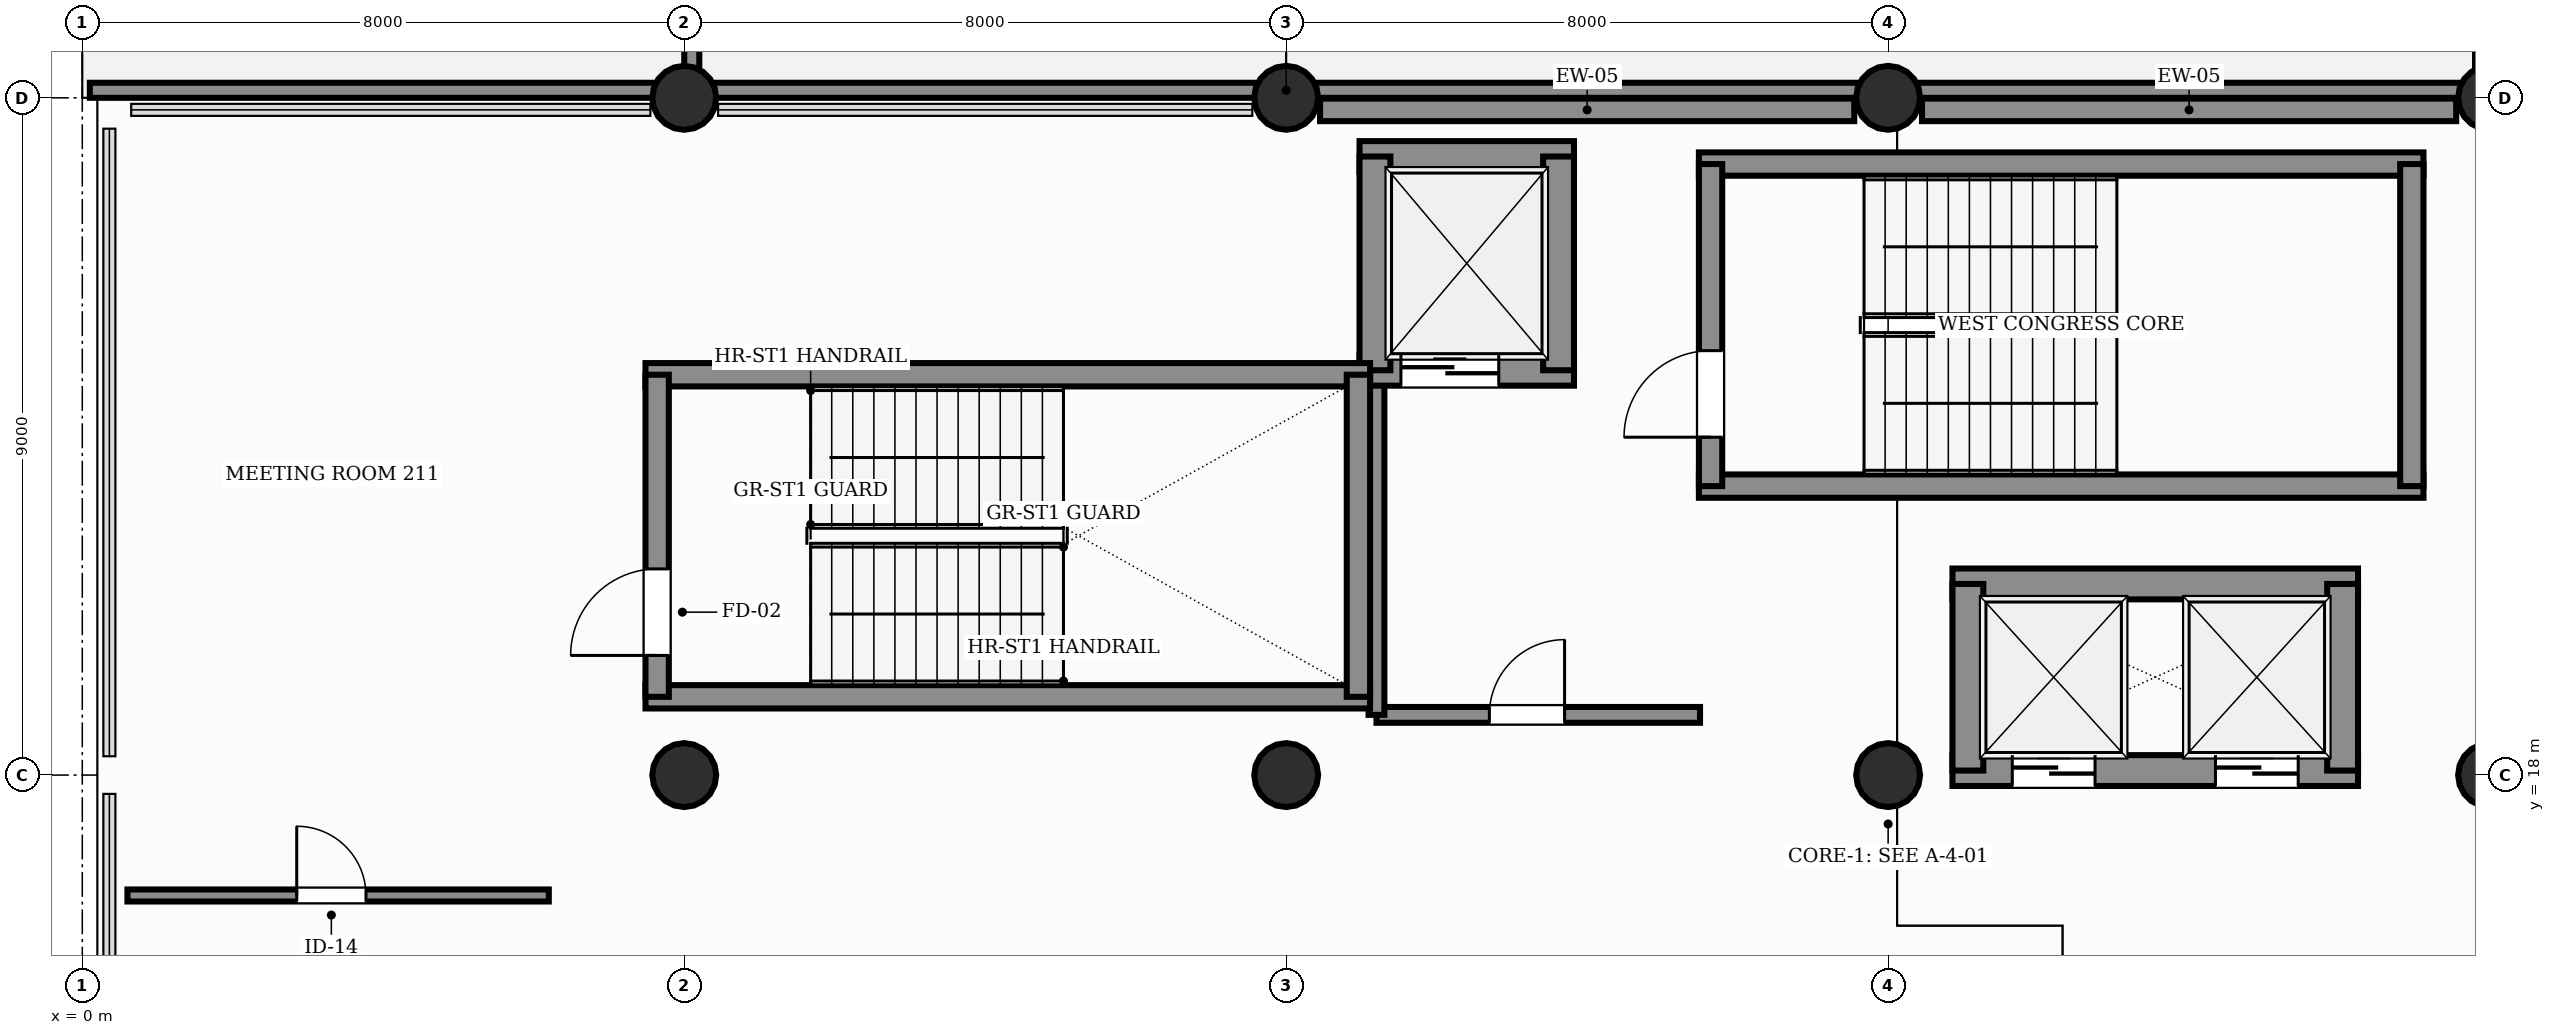
"""IFC4 building model, lengths in metres.
Left out: names, types, materials, properties, quantities, classifications, styles, units other than length and angle.
Written with IfcOpenShell. Run it as: python <this file> out.ifc"""

import sys

from ifc_helpers import new_model, si_unit, direction, frame, frame_2d, origin, origin_2d, place, context, subcontext, project, spatial, rectangle, circle, extrude, element, fill, save


model = new_model("IFC4")
c1 = context("Model", 3, precision=1e-05, world=origin(), true_north=direction((0.0, 1.0)))
c2 = subcontext(c1, "Body", "Model", "MODEL_VIEW")
j1 = project(units=[si_unit("LENGTHUNIT", "METRE"), si_unit("PLANEANGLEUNIT", "RADIAN")], contexts=[c1])
p1 = place(None, origin())
s1 = spatial("IfcSite", under=j1, at=p1, CompositionType="ELEMENT")
p2 = place(p1, origin())
s2 = spatial("IfcBuilding", under=s1, at=p2, CompositionType="ELEMENT")
p3 = place(p2, frame((0.0, 0.0, 11.4)))
s3 = spatial("IfcBuildingStorey", under=s2, at=p3, CompositionType="ELEMENT", Elevation=11.4)
for number, where, z_axis, x_axis in (
    (1, (8.0, 18.0, 0.0), (0.0, 0.0, 1.0), (1.0, 0.0, 0.0)),
    (2, (8.0, 27.0, 0.0), (0.0, 0.0, 1.0), (1.0, 0.0, 0.0)),
    (3, (16.0, 18.0, 0.0), (0.0, 0.0, 1.0), (1.0, 0.0, 0.0)),
    (4, (16.0, 27.0, 0.0), (0.0, 0.0, 1.0), (1.0, 0.0, 0.0)),
    (5, (24.0, 18.0, 0.0), (0.0, 0.0, 1.0), (1.0, 0.0, 0.0)),
    (6, (24.0, 27.0, 0.0), (0.0, 0.0, 1.0), (1.0, 0.0, 0.0)),
    (7, (32.0, 18.0, 0.0), (0.0, 0.0, 1.0), (1.0, 0.0, 0.0)),
    (8, (32.0, 27.0, 0.0), (0.0, 0.0, 1.0), (1.0, 0.0, 0.0)),
):
    element("IfcColumn", number, at=place(p3, frame(where, z_axis=z_axis, x_axis=x_axis)), inside=s3, PredefinedType="COLUMN", context=c2, shape_type="SweptSolid", body=[
        extrude(circle(Radius=0.425, at=origin_2d()), origin(), (0.0, 0.0, 1.0), 4.8),
    ])
for number, where, z_axis, x_axis in (
    (9, (16.45, 26.84, 0.0), (0.0, 0.0, 1.0), (1.0, 0.0, 0.0)),
    (10, (24.45, 26.84, 0.0), (0.0, 0.0, 1.0), (1.0, 0.0, 0.0)),
):
    element("IfcWall", number, at=place(p3, frame(where, z_axis=z_axis, x_axis=x_axis)), inside=s3, PredefinedType="SOLIDWALL", context=c2, shape_type="SweptSolid", body=[
        extrude(rectangle(XDim=7.1, YDim=0.3, at=frame_2d((3.55, 0.0))), origin(), (0.0, 0.0, 1.0), 3.59),
    ])
p4 = place(p3, frame((0.1, 27.1, 0.0), z_axis=(0.0, 0.0, 1.0), x_axis=(1.0, 0.0, 0.0)))
e11 = element("IfcWall", 11, at=p4, inside=s3, PredefinedType="PARAPET", context=c2, shape_type="SweptSolid", body=[
    extrude(rectangle(XDim=31.8, YDim=0.2, at=frame_2d((15.9, 0.0))), origin(), (0.0, 0.0, 1.0), 1.15),
])
p5 = place(p3, frame((31.9, 27.1, 0.0), z_axis=(0.0, 0.0, 1.0), x_axis=(0.0, 1.0, 0.0)))
e12 = element("IfcWall", 12, at=p5, inside=s3, PredefinedType="PARAPET", context=c2, shape_type="SweptSolid", body=[
    extrude(rectangle(XDim=34.65, YDim=0.2, at=frame_2d((17.325, 0.0))), origin(), (0.0, 0.0, 1.0), 1.15),
])
p6 = place(p3, frame((8.1, 36.1, 0.0), z_axis=(0.0, 0.0, 1.0), x_axis=(0.0, -1.0, 0.0)))
e13 = element("IfcWall", 13, at=p6, inside=s3, PredefinedType="PARAPET", context=c2, shape_type="SweptSolid", body=[
    extrude(rectangle(XDim=9.0, YDim=0.2, at=frame_2d((4.5, 0.0))), origin(), (0.0, 0.0, 1.0), 1.15),
])
for number, where, z_axis, x_axis in (
    (14, (21.485, 21.84, 0.0), (0.0, 0.0, 1.0), (1.0, 0.0, 0.0)),
    (15, (21.485, 26.12, 0.0), (0.0, 0.0, 1.0), (1.0, 0.0, 0.0)),
):
    element("IfcWall", number, at=place(p3, frame(where, z_axis=z_axis, x_axis=x_axis)), inside=s3, PredefinedType="SHEAR", context=c2, shape_type="SweptSolid", body=[
        extrude(rectangle(XDim=9.63, YDim=0.31, at=frame_2d((4.815, 0.0))), origin(), (0.0, 0.0, 1.0), 4.8),
    ])
p7 = place(p3, frame((21.64, 21.84, 0.0), z_axis=(0.0, 0.0, 1.0), x_axis=(0.0, 1.0, 0.0)))
e16 = element("IfcWall", 16, at=p7, inside=s3, PredefinedType="SHEAR", context=c2, shape_type="SweptSolid", body=[
    extrude(rectangle(XDim=4.28, YDim=0.31, at=frame_2d((2.14, 0.0))), origin(), (0.0, 0.0, 1.0), 4.8),
])
p8 = place(p7, frame((0.65, 0.0, 0.0)))
e17 = element("IfcOpeningElement", 17, at=p8, cuts=e16, PredefinedType="OPENING", context=c2, shape_type="SweptSolid", body=[
    extrude(rectangle(XDim=1.15, YDim=2.2, at=frame_2d((0.575, 1.1))), frame((0.0, 0.165, 0.0), z_axis=(0.0, -1.0, 0.0), x_axis=(1.0, 0.0, 0.0)), (0.0, 0.0, 1.0), 0.33),
])
p9 = place(p3, frame((30.96, 21.84, 0.0), z_axis=(0.0, 0.0, 1.0), x_axis=(0.0, 1.0, 0.0)))
e18 = element("IfcWall", 18, at=p9, inside=s3, PredefinedType="SHEAR", context=c2, shape_type="SweptSolid", body=[
    extrude(rectangle(XDim=4.28, YDim=0.31, at=frame_2d((2.14, 0.0))), origin(), (0.0, 0.0, 1.0), 4.8),
])
p10 = place(p3, frame((17.2, 18.8, 0.0), z_axis=(0.0, 0.0, 1.0), x_axis=(1.0, 0.0, 0.0)))
e19 = element("IfcWall", 19, at=p10, inside=s3, PredefinedType="PARTITIONING", context=c2, shape_type="SweptSolid", body=[
    extrude(rectangle(XDim=4.3, YDim=0.21, at=frame_2d((2.15, 0.0))), origin(), (0.0, 0.0, 1.0), 3.4),
])
p11 = place(p10, frame((1.5, 0.0, 0.0)))
e20 = element("IfcOpeningElement", 20, at=p11, cuts=e19, PredefinedType="OPENING", context=c2, shape_type="SweptSolid", body=[
    extrude(rectangle(XDim=1.0, YDim=2.15, at=frame_2d((0.5, 1.075))), frame((0.0, 0.115, 0.0), z_axis=(0.0, -1.0, 0.0), x_axis=(1.0, 0.0, 0.0)), (0.0, 0.0, 1.0), 0.23),
])
p12 = place(p3, frame((17.2, 18.8, 0.0), z_axis=(0.0, 0.0, 1.0), x_axis=(0.0, 1.0, 0.0)))
e21 = element("IfcWall", 21, at=p12, inside=s3, PredefinedType="PARTITIONING", context=c2, shape_type="SweptSolid", body=[
    extrude(rectangle(XDim=4.6, YDim=0.21, at=frame_2d((2.3, 0.0))), origin(), (0.0, 0.0, 1.0), 3.4),
])
p13 = place(p3, frame((16.975, 23.38, 0.0), z_axis=(0.0, 0.0, 1.0), x_axis=(1.0, 0.0, 0.0)))
e22 = element("IfcWall", 22, at=p13, inside=s3, PredefinedType="SHEAR", context=c2, shape_type="SweptSolid", body=[
    extrude(rectangle(XDim=2.85, YDim=0.41, at=frame_2d((1.425, 0.0))), origin(), (0.0, 0.0, 1.0), 4.8),
])
p14 = place(p13, frame((0.55, 0.0, 0.0)))
e23 = element("IfcOpeningElement", 23, at=p14, cuts=e22, PredefinedType="OPENING", context=c2, shape_type="SweptSolid", body=[
    extrude(rectangle(XDim=1.3, YDim=2.25, at=frame_2d((0.65, 1.125))), frame((0.0, 0.215, 0.0), z_axis=(0.0, -1.0, 0.0), x_axis=(1.0, 0.0, 0.0)), (0.0, 0.0, 1.0), 0.43),
])
p15 = place(p3, frame((16.975, 26.22, 0.0), z_axis=(0.0, 0.0, 1.0), x_axis=(1.0, 0.0, 0.0)))
e24 = element("IfcWall", 24, at=p15, inside=s3, PredefinedType="SHEAR", context=c2, shape_type="SweptSolid", body=[
    extrude(rectangle(XDim=2.85, YDim=0.41, at=frame_2d((1.425, 0.0))), origin(), (0.0, 0.0, 1.0), 4.8),
])
for number, where, z_axis, x_axis in (
    (25, (17.18, 23.38, 0.0), (0.0, 0.0, 1.0), (0.0, 1.0, 0.0)),
    (26, (19.62, 23.38, 0.0), (0.0, 0.0, 1.0), (0.0, 1.0, 0.0)),
):
    element("IfcWall", number, at=place(p3, frame(where, z_axis=z_axis, x_axis=x_axis)), inside=s3, PredefinedType="SHEAR", context=c2, shape_type="SweptSolid", body=[
        extrude(rectangle(XDim=2.84, YDim=0.41, at=frame_2d((1.42, 0.0))), origin(), (0.0, 0.0, 1.0), 4.8),
    ])
p16 = place(p3, frame((24.855, 18.06, 0.0), z_axis=(0.0, 0.0, 1.0), x_axis=(1.0, 0.0, 0.0)))
e27 = element("IfcWall", 27, at=p16, inside=s3, PredefinedType="SHEAR", context=c2, shape_type="SweptSolid", body=[
    extrude(rectangle(XDim=5.39, YDim=0.41, at=frame_2d((2.695, 0.0))), origin(), (0.0, 0.0, 1.0), 4.8),
])
p17 = place(p16, frame((0.795, 0.0, 0.0)))
e28 = element("IfcOpeningElement", 28, at=p17, cuts=e27, PredefinedType="OPENING", context=c2, shape_type="SweptSolid", body=[
    extrude(rectangle(XDim=1.1, YDim=2.2, at=frame_2d((0.55, 1.1))), frame((0.0, 0.215, 0.0), z_axis=(0.0, -1.0, 0.0), x_axis=(1.0, 0.0, 0.0)), (0.0, 0.0, 1.0), 0.43),
])
p18 = place(p16, frame((3.495, 0.0, 0.0)))
e29 = element("IfcOpeningElement", 29, at=p18, cuts=e27, PredefinedType="OPENING", context=c2, shape_type="SweptSolid", body=[
    extrude(rectangle(XDim=1.1, YDim=2.2, at=frame_2d((0.55, 1.1))), frame((0.0, 0.215, 0.0), z_axis=(0.0, -1.0, 0.0), x_axis=(1.0, 0.0, 0.0)), (0.0, 0.0, 1.0), 0.43),
])
p19 = place(p3, frame((24.855, 20.54, 0.0), z_axis=(0.0, 0.0, 1.0), x_axis=(1.0, 0.0, 0.0)))
e30 = element("IfcWall", 30, at=p19, inside=s3, PredefinedType="SHEAR", context=c2, shape_type="SweptSolid", body=[
    extrude(rectangle(XDim=5.39, YDim=0.41, at=frame_2d((2.695, 0.0))), origin(), (0.0, 0.0, 1.0), 4.8),
])
for number, where, z_axis, x_axis in (
    (31, (25.06, 18.06, 0.0), (0.0, 0.0, 1.0), (0.0, 1.0, 0.0)),
    (32, (30.04, 18.06, 0.0), (0.0, 0.0, 1.0), (0.0, 1.0, 0.0)),
):
    element("IfcWall", number, at=place(p3, frame(where, z_axis=z_axis, x_axis=x_axis)), inside=s3, PredefinedType="SHEAR", context=c2, shape_type="SweptSolid", body=[
        extrude(rectangle(XDim=2.48, YDim=0.41, at=frame_2d((1.24, 0.0))), origin(), (0.0, 0.0, 1.0), 4.8),
    ])
for number, where, z_axis, x_axis in (
    (33, (7.485, 19.04, 0.0), (0.0, 0.0, 1.0), (1.0, 0.0, 0.0)),
    (34, (7.485, 23.32, 0.0), (0.0, 0.0, 1.0), (1.0, 0.0, 0.0)),
):
    element("IfcWall", number, at=place(p3, frame(where, z_axis=z_axis, x_axis=x_axis)), inside=s3, PredefinedType="SHEAR", context=c2, shape_type="SweptSolid", body=[
        extrude(rectangle(XDim=9.63, YDim=0.31, at=frame_2d((4.815, 0.0))), origin(), (0.0, 0.0, 1.0), 4.8),
    ])
p20 = place(p3, frame((7.64, 19.04, 0.0), z_axis=(0.0, 0.0, 1.0), x_axis=(0.0, 1.0, 0.0)))
e35 = element("IfcWall", 35, at=p20, inside=s3, PredefinedType="SHEAR", context=c2, shape_type="SweptSolid", body=[
    extrude(rectangle(XDim=4.28, YDim=0.31, at=frame_2d((2.14, 0.0))), origin(), (0.0, 0.0, 1.0), 4.8),
])
p21 = place(p20, frame((0.55, 0.0, 0.0)))
e36 = element("IfcOpeningElement", 36, at=p21, cuts=e35, PredefinedType="OPENING", context=c2, shape_type="SweptSolid", body=[
    extrude(rectangle(XDim=1.15, YDim=2.2, at=frame_2d((0.575, 1.1))), frame((0.0, 0.165, 0.0), z_axis=(0.0, -1.0, 0.0), x_axis=(1.0, 0.0, 0.0)), (0.0, 0.0, 1.0), 0.33),
])
p22 = place(p3, frame((16.96, 19.04, 0.0), z_axis=(0.0, 0.0, 1.0), x_axis=(0.0, 1.0, 0.0)))
e37 = element("IfcWall", 37, at=p22, inside=s3, PredefinedType="SHEAR", context=c2, shape_type="SweptSolid", body=[
    extrude(rectangle(XDim=4.28, YDim=0.31, at=frame_2d((2.14, 0.0))), origin(), (0.0, 0.0, 1.0), 4.8),
])
p23 = place(p3, frame((0.6, 16.4, 0.0), z_axis=(0.0, 0.0, 1.0), x_axis=(1.0, 0.0, 0.0)))
e38 = element("IfcWall", 38, at=p23, inside=s3, PredefinedType="PARTITIONING", context=c2, shape_type="SweptSolid", body=[
    extrude(rectangle(XDim=5.6, YDim=0.16, at=frame_2d((2.8, 0.0))), origin(), (0.0, 0.0, 1.0), 3.4),
])
p24 = place(p23, frame((2.25, 0.0, 0.0)))
e39 = element("IfcOpeningElement", 39, at=p24, cuts=e38, PredefinedType="OPENING", context=c2, shape_type="SweptSolid", body=[
    extrude(rectangle(XDim=0.92, YDim=2.15, at=frame_2d((0.46, 1.075))), frame((0.0, 0.09, 0.0), z_axis=(0.0, -1.0, 0.0), x_axis=(1.0, 0.0, 0.0)), (0.0, 0.0, 1.0), 0.18),
])
p25 = place(p8, origin())
e40 = element("IfcDoor", 40, at=p25, inside=s3, OperationType="SINGLE_SWING_LEFT", PredefinedType="DOOR", context=c2, shape_type="SweptSolid", body=[
    extrude(rectangle(XDim=1.15, YDim=2.2, at=frame_2d((0.575, 1.1))), frame((0.0, 0.025, 0.0), z_axis=(0.0, -1.0, 0.0), x_axis=(1.0, 0.0, 0.0)), (0.0, 0.0, 1.0), 0.05),
])
fill(e17, e40)
p26 = place(p11, origin())
e41 = element("IfcDoor", 41, at=p26, inside=s3, OperationType="SINGLE_SWING_RIGHT", PredefinedType="DOOR", context=c2, shape_type="SweptSolid", body=[
    extrude(rectangle(XDim=1.0, YDim=2.15, at=frame_2d((0.5, 1.075))), frame((0.0, 0.025, 0.0), z_axis=(0.0, -1.0, 0.0), x_axis=(1.0, 0.0, 0.0)), (0.0, 0.0, 1.0), 0.05),
])
fill(e20, e41)
p27 = place(p14, origin())
e42 = element("IfcDoor", 42, at=p27, inside=s3, OperationType="DOUBLE_DOOR_SLIDING", PredefinedType="DOOR", context=c2, shape_type="SweptSolid", body=[
    extrude(rectangle(XDim=1.3, YDim=2.25, at=frame_2d((0.65, 1.125))), frame((0.0, 0.025, 0.0), z_axis=(0.0, -1.0, 0.0), x_axis=(1.0, 0.0, 0.0)), (0.0, 0.0, 1.0), 0.05),
])
fill(e23, e42)
p28 = place(p17, origin())
e43 = element("IfcDoor", 43, at=p28, inside=s3, OperationType="DOUBLE_DOOR_SLIDING", PredefinedType="DOOR", context=c2, shape_type="SweptSolid", body=[
    extrude(rectangle(XDim=1.1, YDim=2.2, at=frame_2d((0.55, 1.1))), frame((0.0, 0.025, 0.0), z_axis=(0.0, -1.0, 0.0), x_axis=(1.0, 0.0, 0.0)), (0.0, 0.0, 1.0), 0.05),
])
fill(e28, e43)
p29 = place(p18, origin())
e44 = element("IfcDoor", 44, at=p29, inside=s3, OperationType="DOUBLE_DOOR_SLIDING", PredefinedType="DOOR", context=c2, shape_type="SweptSolid", body=[
    extrude(rectangle(XDim=1.1, YDim=2.2, at=frame_2d((0.55, 1.1))), frame((0.0, 0.025, 0.0), z_axis=(0.0, -1.0, 0.0), x_axis=(1.0, 0.0, 0.0)), (0.0, 0.0, 1.0), 0.05),
])
fill(e29, e44)
p30 = place(p21, origin())
e45 = element("IfcDoor", 45, at=p30, inside=s3, OperationType="SINGLE_SWING_LEFT", PredefinedType="DOOR", context=c2, shape_type="SweptSolid", body=[
    extrude(rectangle(XDim=1.15, YDim=2.2, at=frame_2d((0.575, 1.1))), frame((0.0, 0.025, 0.0), z_axis=(0.0, -1.0, 0.0), x_axis=(1.0, 0.0, 0.0)), (0.0, 0.0, 1.0), 0.05),
])
fill(e36, e45)
p31 = place(p24, origin())
e46 = element("IfcDoor", 46, at=p31, inside=s3, OperationType="SINGLE_SWING_LEFT", PredefinedType="DOOR", context=c2, shape_type="SweptSolid", body=[
    extrude(rectangle(XDim=0.92, YDim=2.15, at=frame_2d((0.46, 1.075))), frame((0.0, 0.025, 0.0), z_axis=(0.0, -1.0, 0.0), x_axis=(1.0, 0.0, 0.0)), (0.0, 0.0, 1.0), 0.05),
])
fill(e39, e46)
save(model, sys.argv[1])
